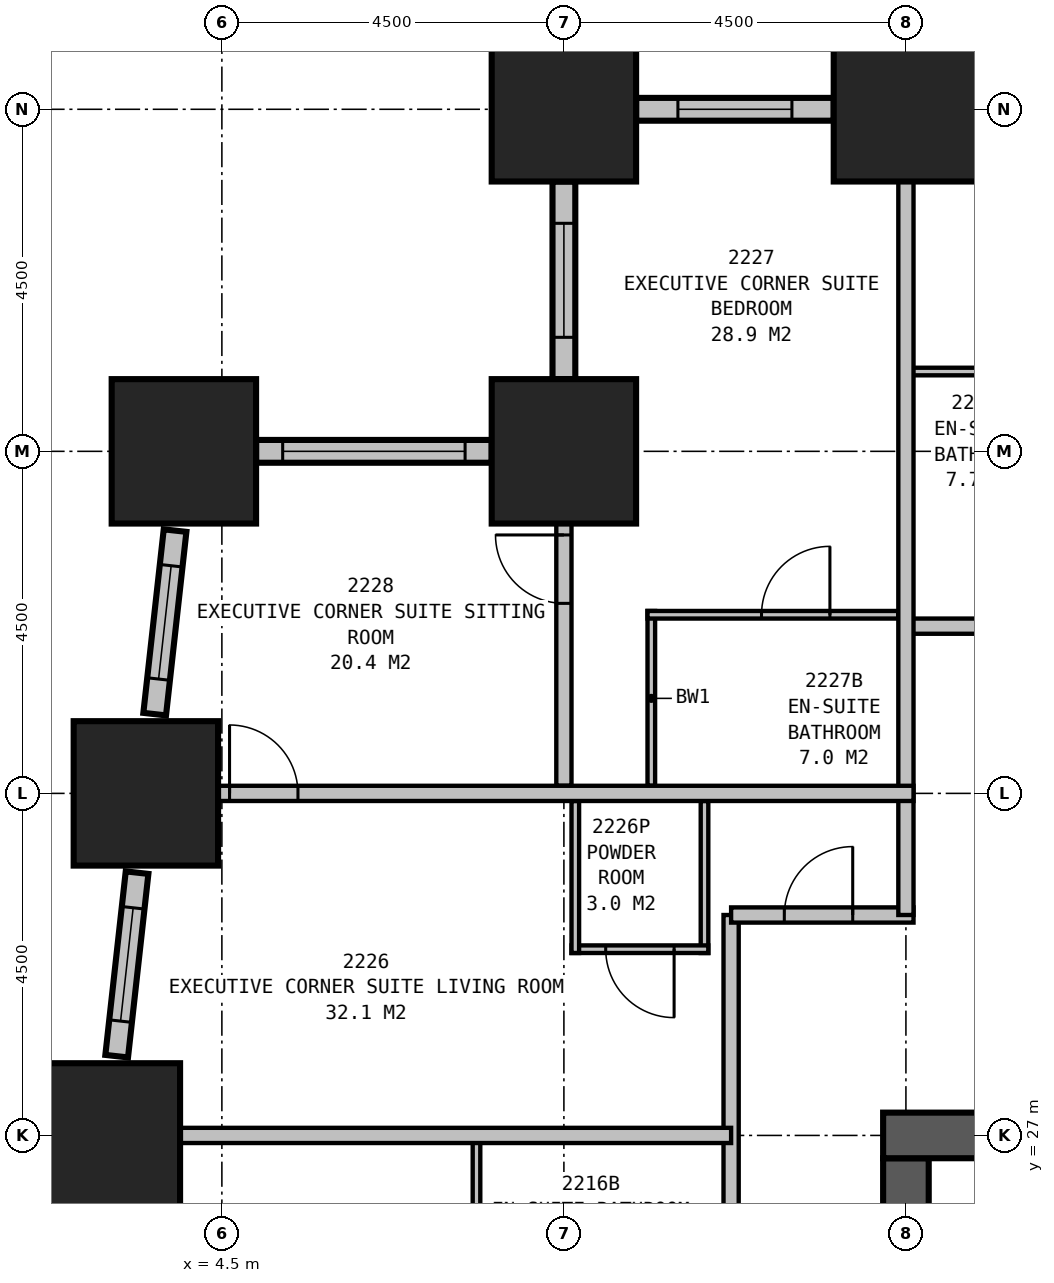
"""IFC4 building model, lengths in metres.
Left out: names, types, materials, properties, quantities, classifications, styles, units other than length and angle.
Written with IfcOpenShell. Run it as: python <this file> out.ifc"""

import sys

from ifc_helpers import new_model, si_unit, direction, frame, frame_2d, origin, origin_2d, place, context, subcontext, project, spatial, rectangle, extrude, element, fill, save


model = new_model("IFC4")
c1 = context("Model", 3, precision=1e-05, world=origin(), true_north=direction((0.0, 1.0)))
c2 = subcontext(c1, "Body", "Model", "MODEL_VIEW")
j1 = project(units=[si_unit("LENGTHUNIT", "METRE"), si_unit("PLANEANGLEUNIT", "RADIAN")], contexts=[c1])
p1 = place(None, origin())
s1 = spatial("IfcSite", under=j1, at=p1, CompositionType="ELEMENT")
p2 = place(p1, origin())
s2 = spatial("IfcBuilding", under=s1, at=p2, CompositionType="ELEMENT")
p3 = place(p2, frame((0.0, 0.0, 89.9)))
s3 = spatial("IfcBuildingStorey", under=s2, at=p3, CompositionType="ELEMENT", Elevation=89.9)
for number, where, z_axis, x_axis in (
    (1, (13.5, 40.5, 0.0), (0.0, 0.0, 1.0), (1.0, 0.0, 0.0)),
    (2, (9.0, 40.5, 0.0), (0.0, 0.0, 1.0), (1.0, 0.0, 0.0)),
    (3, (9.0, 36.0, 0.0), (0.0, 0.0, 1.0), (1.0, 0.0, 0.0)),
    (4, (4.0, 36.0, 0.0), (0.0, 0.0, 1.0), (1.0, 0.0, 0.0)),
    (5, (3.5, 31.5, 0.0), (0.0, 0.0, 1.0), (1.0, 0.0, 0.0)),
    (6, (3.0, 27.0, 0.0), (0.0, 0.0, 1.0), (1.0, 0.0, 0.0)),
):
    element("IfcColumn", number, at=place(p3, frame(where, z_axis=z_axis, x_axis=x_axis)), inside=s3, PredefinedType="COLUMN", context=c2, shape_type="SweptSolid", body=[
        extrude(rectangle(XDim=1.9, YDim=1.9, at=origin_2d()), origin(), (0.0, 0.0, 1.0), 3.5),
    ])
p4 = place(p3, frame((36.3, 27.0, 0.0), z_axis=(0.0, 0.0, 1.0), x_axis=(-1.0, 0.0, 0.0)))
e7 = element("IfcWall", 7, at=p4, inside=s3, PredefinedType="SHEAR", context=c2, shape_type="SweptSolid", body=[
    extrude(rectangle(XDim=23.1, YDim=0.6, at=frame_2d((11.55, 0.0))), origin(), (0.0, 0.0, 1.0), 3.5),
])
p5 = place(p4, frame((17.05, 0.0, 0.0)))
e8 = element("IfcOpeningElement", 8, at=p5, cuts=e7, PredefinedType="OPENING", context=c2, shape_type="SweptSolid", body=[
    extrude(rectangle(XDim=1.0, YDim=2.1, at=frame_2d((0.5, 1.05))), frame((0.0, 0.31, 0.0), z_axis=(0.0, -1.0, 0.0), x_axis=(1.0, 0.0, 0.0)), (0.0, 0.0, 1.0), 0.62),
])
p6 = place(p4, frame((12.05, 0.0, 0.0)))
e9 = element("IfcOpeningElement", 9, at=p6, cuts=e7, PredefinedType="OPENING", context=c2, shape_type="SweptSolid", body=[
    extrude(rectangle(XDim=1.0, YDim=2.1, at=frame_2d((0.5, 1.05))), frame((0.0, 0.31, 0.0), z_axis=(0.0, -1.0, 0.0), x_axis=(1.0, 0.0, 0.0)), (0.0, 0.0, 1.0), 0.62),
])
p7 = place(p4, frame((7.05, 0.0, 0.0)))
e10 = element("IfcOpeningElement", 10, at=p7, cuts=e7, PredefinedType="OPENING", context=c2, shape_type="SweptSolid", body=[
    extrude(rectangle(XDim=1.0, YDim=2.1, at=frame_2d((0.5, 1.05))), frame((0.0, 0.31, 0.0), z_axis=(0.0, -1.0, 0.0), x_axis=(1.0, 0.0, 0.0)), (0.0, 0.0, 1.0), 0.62),
])
p8 = place(p3, frame((13.5, 26.7, 0.0), z_axis=(0.0, 0.0, 1.0), x_axis=(0.0, -1.0, 0.0)))
e11 = element("IfcWall", 11, at=p8, inside=s3, PredefinedType="SHEAR", context=c2, shape_type="SweptSolid", body=[
    extrude(rectangle(XDim=6.7, YDim=0.6, at=frame_2d((3.35, 0.0))), origin(), (0.0, 0.0, 1.0), 3.5),
])
p9 = place(p3, frame((12.55, 40.5, 0.0), z_axis=(0.0, 0.0, 1.0), x_axis=(-1.0, 0.0, 0.0)))
e12 = element("IfcWall", 12, at=p9, inside=s3, PredefinedType="STANDARD", context=c2, shape_type="SweptSolid", body=[
    extrude(rectangle(XDim=2.6, YDim=0.3, at=frame_2d((1.3, 0.0))), origin(), (0.0, 0.0, 1.0), 2.15),
])
p10 = place(p9, frame((0.55, 0.0, 0.5)))
e13 = element("IfcOpeningElement", 13, at=p10, cuts=e12, PredefinedType="OPENING", context=c2, shape_type="SweptSolid", body=[
    extrude(rectangle(XDim=1.5, YDim=1.5, at=frame_2d((0.75, 0.75))), frame((0.0, 0.16, 0.0), z_axis=(0.0, -1.0, 0.0), x_axis=(1.0, 0.0, 0.0)), (0.0, 0.0, 1.0), 0.32),
])
p11 = place(p3, frame((9.0, 39.55, 0.0), z_axis=(0.0, 0.0, 1.0), x_axis=(0.0, -1.0, 0.0)))
e14 = element("IfcWall", 14, at=p11, inside=s3, PredefinedType="STANDARD", context=c2, shape_type="SweptSolid", body=[
    extrude(rectangle(XDim=2.6, YDim=0.3, at=frame_2d((1.3, 0.0))), origin(), (0.0, 0.0, 1.0), 2.15),
])
p12 = place(p11, frame((0.55, 0.0, 0.5)))
e15 = element("IfcOpeningElement", 15, at=p12, cuts=e14, PredefinedType="OPENING", context=c2, shape_type="SweptSolid", body=[
    extrude(rectangle(XDim=1.5, YDim=1.5, at=frame_2d((0.75, 0.75))), frame((0.0, 0.16, 0.0), z_axis=(0.0, -1.0, 0.0), x_axis=(1.0, 0.0, 0.0)), (0.0, 0.0, 1.0), 0.32),
])
p13 = place(p3, frame((8.05, 36.0, 0.0), z_axis=(0.0, 0.0, 1.0), x_axis=(-1.0, 0.0, 0.0)))
e16 = element("IfcWall", 16, at=p13, inside=s3, PredefinedType="STANDARD", context=c2, shape_type="SweptSolid", body=[
    extrude(rectangle(XDim=3.1, YDim=0.3, at=frame_2d((1.55, 0.0))), origin(), (0.0, 0.0, 1.0), 2.15),
])
p14 = place(p13, frame((0.35, 0.0, 0.5)))
e17 = element("IfcOpeningElement", 17, at=p14, cuts=e16, PredefinedType="OPENING", context=c2, shape_type="SweptSolid", body=[
    extrude(rectangle(XDim=2.4, YDim=1.5, at=frame_2d((1.2, 0.75))), frame((0.0, 0.16, 0.0), z_axis=(0.0, -1.0, 0.0), x_axis=(1.0, 0.0, 0.0)), (0.0, 0.0, 1.0), 0.32),
])
p15 = place(p3, frame((3.884, 34.957, 0.0), z_axis=(0.0, 0.0, 1.0), x_axis=(-0.110343286306, -0.993893535127, 0.0)))
e18 = element("IfcWall", 18, at=p15, inside=s3, PredefinedType="STANDARD", context=c2, shape_type="SweptSolid", body=[
    extrude(rectangle(XDim=2.429, YDim=0.3, at=frame_2d((1.215, 0.0))), origin(), (0.0, 0.0, 1.0), 2.15),
])
p16 = place(p15, frame((0.465, 0.0, 0.5)))
e19 = element("IfcOpeningElement", 19, at=p16, cuts=e18, PredefinedType="OPENING", context=c2, shape_type="SweptSolid", body=[
    extrude(rectangle(XDim=1.5, YDim=1.5, at=frame_2d((0.75, 0.75))), frame((0.0, 0.16, 0.0), z_axis=(0.0, -1.0, 0.0), x_axis=(1.0, 0.0, 0.0)), (0.0, 0.0, 1.0), 0.32),
])
p17 = place(p3, frame((3.384, 30.457, 0.0), z_axis=(0.0, 0.0, 1.0), x_axis=(-0.110343286306, -0.993893535127, 0.0)))
e20 = element("IfcWall", 20, at=p17, inside=s3, PredefinedType="STANDARD", context=c2, shape_type="SweptSolid", body=[
    extrude(rectangle(XDim=2.429, YDim=0.3, at=frame_2d((1.215, 0.0))), origin(), (0.0, 0.0, 1.0), 2.15),
])
p18 = place(p17, frame((0.465, 0.0, 0.5)))
e21 = element("IfcOpeningElement", 21, at=p18, cuts=e20, PredefinedType="OPENING", context=c2, shape_type="SweptSolid", body=[
    extrude(rectangle(XDim=1.5, YDim=1.5, at=frame_2d((0.75, 0.75))), frame((0.0, 0.16, 0.0), z_axis=(0.0, -1.0, 0.0), x_axis=(1.0, 0.0, 0.0)), (0.0, 0.0, 1.0), 0.32),
])
p19 = place(p3, frame((13.5, 33.7, 0.0), z_axis=(0.0, 0.0, 1.0), x_axis=(1.0, 0.0, 0.0)))
e22 = element("IfcWall", 22, at=p19, inside=s3, PredefinedType="PARTITIONING", context=c2, shape_type="SweptSolid", body=[
    extrude(rectangle(XDim=22.5, YDim=0.2, at=frame_2d((11.25, 0.0))), origin(), (0.0, 0.0, 1.0), 3.25),
])
p20 = place(p19, frame((2.95, 0.0, 0.0)))
e23 = element("IfcOpeningElement", 23, at=p20, cuts=e22, PredefinedType="OPENING", context=c2, shape_type="SweptSolid", body=[
    extrude(rectangle(XDim=0.9, YDim=2.1, at=frame_2d((0.45, 1.05))), frame((0.0, 0.11, 0.0), z_axis=(0.0, -1.0, 0.0), x_axis=(1.0, 0.0, 0.0)), (0.0, 0.0, 1.0), 0.22),
])
p21 = place(p19, frame((7.45, 0.0, 0.0)))
e24 = element("IfcOpeningElement", 24, at=p21, cuts=e22, PredefinedType="OPENING", context=c2, shape_type="SweptSolid", body=[
    extrude(rectangle(XDim=0.9, YDim=2.1, at=frame_2d((0.45, 1.05))), frame((0.0, 0.11, 0.0), z_axis=(0.0, -1.0, 0.0), x_axis=(1.0, 0.0, 0.0)), (0.0, 0.0, 1.0), 0.22),
])
p22 = place(p19, frame((9.65, 0.0, 0.0)))
e25 = element("IfcOpeningElement", 25, at=p22, cuts=e22, PredefinedType="OPENING", context=c2, shape_type="SweptSolid", body=[
    extrude(rectangle(XDim=0.9, YDim=2.1, at=frame_2d((0.45, 1.05))), frame((0.0, 0.11, 0.0), z_axis=(0.0, -1.0, 0.0), x_axis=(1.0, 0.0, 0.0)), (0.0, 0.0, 1.0), 0.22),
])
p23 = place(p19, frame((16.45, 0.0, 0.0)))
e26 = element("IfcOpeningElement", 26, at=p23, cuts=e22, PredefinedType="OPENING", context=c2, shape_type="SweptSolid", body=[
    extrude(rectangle(XDim=0.9, YDim=2.1, at=frame_2d((0.45, 1.05))), frame((0.0, 0.11, 0.0), z_axis=(0.0, -1.0, 0.0), x_axis=(1.0, 0.0, 0.0)), (0.0, 0.0, 1.0), 0.22),
])
p24 = place(p19, frame((20.95, 0.0, 0.0)))
e27 = element("IfcOpeningElement", 27, at=p24, cuts=e22, PredefinedType="OPENING", context=c2, shape_type="SweptSolid", body=[
    extrude(rectangle(XDim=0.9, YDim=2.1, at=frame_2d((0.45, 1.05))), frame((0.0, 0.11, 0.0), z_axis=(0.0, -1.0, 0.0), x_axis=(1.0, 0.0, 0.0)), (0.0, 0.0, 1.0), 0.22),
])
p25 = place(p3, frame((11.2, 29.9, 0.0), z_axis=(0.0, 0.0, 1.0), x_axis=(1.0, 0.0, 0.0)))
e28 = element("IfcWall", 28, at=p25, inside=s3, PredefinedType="PARTITIONING", context=c2, shape_type="SweptSolid", body=[
    extrude(rectangle(XDim=2.4, YDim=0.2, at=frame_2d((1.2, 0.0))), origin(), (0.0, 0.0, 1.0), 3.25),
])
p26 = place(p25, frame((0.7, 0.0, 0.0)))
e29 = element("IfcOpeningElement", 29, at=p26, cuts=e28, PredefinedType="OPENING", context=c2, shape_type="SweptSolid", body=[
    extrude(rectangle(XDim=0.9, YDim=2.1, at=frame_2d((0.45, 1.05))), frame((0.0, 0.11, 0.0), z_axis=(0.0, -1.0, 0.0), x_axis=(1.0, 0.0, 0.0)), (0.0, 0.0, 1.0), 0.22),
])
p27 = place(p3, frame((11.2, 10.6, 0.0), z_axis=(0.0, 0.0, 1.0), x_axis=(0.0, 1.0, 0.0)))
e30 = element("IfcWall", 30, at=p27, inside=s3, PredefinedType="PARTITIONING", context=c2, shape_type="SweptSolid", body=[
    extrude(rectangle(XDim=19.3, YDim=0.2, at=frame_2d((9.65, 0.0))), origin(), (0.0, 0.0, 1.0), 3.25),
])
p28 = place(p27, frame((6.05, 0.0, 0.0)))
e31 = element("IfcOpeningElement", 31, at=p28, cuts=e30, PredefinedType="OPENING", context=c2, shape_type="SweptSolid", body=[
    extrude(rectangle(XDim=1.0, YDim=2.1, at=frame_2d((0.5, 1.05))), frame((0.0, 0.11, 0.0), z_axis=(0.0, -1.0, 0.0), x_axis=(1.0, 0.0, 0.0)), (0.0, 0.0, 1.0), 0.22),
])
p29 = place(p27, frame((10.15, 0.0, 0.0)))
e32 = element("IfcOpeningElement", 32, at=p29, cuts=e30, PredefinedType="OPENING", context=c2, shape_type="SweptSolid", body=[
    extrude(rectangle(XDim=0.9, YDim=2.1, at=frame_2d((0.45, 1.05))), frame((0.0, 0.11, 0.0), z_axis=(0.0, -1.0, 0.0), x_axis=(1.0, 0.0, 0.0)), (0.0, 0.0, 1.0), 0.22),
])
p30 = place(p3, frame((13.5, 37.05, 0.0), z_axis=(0.0, 0.0, 1.0), x_axis=(1.0, 0.0, 0.0)))
e33 = element("IfcWall", 33, at=p30, inside=s3, PredefinedType="PLUMBINGWALL", context=c2, shape_type="SweptSolid", body=[
    extrude(rectangle(XDim=2.6, YDim=0.1, at=frame_2d((1.3, 0.0))), origin(), (0.0, 0.0, 1.0), 3.25),
])
p31 = place(p3, frame((7.85, 24.0, 0.0), z_axis=(0.0, 0.0, 1.0), x_axis=(0.0, 1.0, 0.0)))
e34 = element("IfcWall", 34, at=p31, inside=s3, PredefinedType="PLUMBINGWALL", context=c2, shape_type="SweptSolid", body=[
    extrude(rectangle(XDim=3.0, YDim=0.1, at=frame_2d((1.5, 0.0))), origin(), (0.0, 0.0, 1.0), 3.25),
])
p32 = place(p3, frame((11.2, 27.0, 0.0), z_axis=(0.0, 0.0, 1.0), x_axis=(-1.0, 0.0, 0.0)))
e35 = element("IfcWall", 35, at=p32, inside=s3, PredefinedType="PARTITIONING", context=c2, shape_type="SweptSolid", body=[
    extrude(rectangle(XDim=7.977, YDim=0.2, at=frame_2d((3.988, 0.0))), origin(), (0.0, 0.0, 1.0), 1.95),
])
p33 = place(p3, frame((13.5, 29.9, 0.0), z_axis=(0.0, 0.0, 1.0), x_axis=(0.0, 1.0, 0.0)))
e36 = element("IfcWall", 36, at=p33, inside=s3, PredefinedType="PARTITIONING", context=c2, shape_type="SweptSolid", body=[
    extrude(rectangle(XDim=10.6, YDim=0.2, at=frame_2d((5.3, 0.0))), origin(), (0.0, 0.0, 1.0), 2.25),
])
p34 = place(p3, frame((13.6, 31.5, 0.0), z_axis=(0.0, 0.0, 1.0), x_axis=(-1.0, 0.0, 0.0)))
e37 = element("IfcWall", 37, at=p34, inside=s3, PredefinedType="PARTITIONING", context=c2, shape_type="SweptSolid", body=[
    extrude(rectangle(XDim=10.099, YDim=0.2, at=frame_2d((5.05, 0.0))), origin(), (0.0, 0.0, 1.0), 3.25),
])
p35 = place(p34, frame((8.999, 0.0, 0.0), z_axis=(0.0, 0.0, 1.0), x_axis=(-1.0, 0.0, 0.0)))
e38 = element("IfcOpeningElement", 38, at=p35, cuts=e37, PredefinedType="OPENING", context=c2, shape_type="SweptSolid", body=[
    extrude(rectangle(XDim=0.9, YDim=2.1, at=frame_2d((0.45, 1.05))), frame((0.0, 0.11, 0.0), z_axis=(0.0, -1.0, 0.0), x_axis=(1.0, 0.0, 0.0)), (0.0, 0.0, 1.0), 0.22),
])
p36 = place(p3, frame((9.15, 31.4, 0.0), z_axis=(0.0, 0.0, 1.0), x_axis=(0.0, -1.0, 0.0)))
e39 = element("IfcWall", 39, at=p36, inside=s3, PredefinedType="PLUMBINGWALL", context=c2, shape_type="SweptSolid", body=[
    extrude(rectangle(XDim=2.0, YDim=0.1, at=frame_2d((1.0, 0.0))), origin(), (0.0, 0.0, 1.0), 2.25),
])
p37 = place(p3, frame((10.85, 31.4, 0.0), z_axis=(0.0, 0.0, 1.0), x_axis=(0.0, -1.0, 0.0)))
e40 = element("IfcWall", 40, at=p37, inside=s3, PredefinedType="PLUMBINGWALL", context=c2, shape_type="SweptSolid", body=[
    extrude(rectangle(XDim=2.0, YDim=0.1, at=frame_2d((1.0, 0.0))), origin(), (0.0, 0.0, 1.0), 3.25),
])
p38 = place(p3, frame((10.9, 29.45, 0.0), z_axis=(0.0, 0.0, 1.0), x_axis=(-1.0, 0.0, 0.0)))
e41 = element("IfcWall", 41, at=p38, inside=s3, PredefinedType="PLUMBINGWALL", context=c2, shape_type="SweptSolid", body=[
    extrude(rectangle(XDim=1.8, YDim=0.1, at=frame_2d((0.9, 0.0))), origin(), (0.0, 0.0, 1.0), 3.25),
])
p39 = place(p38, frame((0.45, 0.0, 0.0)))
e42 = element("IfcOpeningElement", 42, at=p39, cuts=e41, PredefinedType="OPENING", context=c2, shape_type="SweptSolid", body=[
    extrude(rectangle(XDim=0.9, YDim=2.1, at=frame_2d((0.45, 1.05))), frame((0.0, 0.06, 0.0), z_axis=(0.0, -1.0, 0.0), x_axis=(1.0, 0.0, 0.0)), (0.0, 0.0, 1.0), 0.12),
])
p40 = place(p3, frame((9.0, 31.6, 0.0), z_axis=(0.0, 0.0, 1.0), x_axis=(0.0, 1.0, 0.0)))
e43 = element("IfcWall", 43, at=p40, inside=s3, PredefinedType="PARTITIONING", context=c2, shape_type="SweptSolid", body=[
    extrude(rectangle(XDim=4.4, YDim=0.2, at=frame_2d((2.2, 0.0))), origin(), (0.0, 0.0, 1.0), 2.25),
])
p41 = place(p40, frame((2.4, 0.0, 0.0)))
e44 = element("IfcOpeningElement", 44, at=p41, cuts=e43, PredefinedType="OPENING", context=c2, shape_type="SweptSolid", body=[
    extrude(rectangle(XDim=0.9, YDim=2.1, at=frame_2d((0.45, 1.05))), frame((0.0, 0.11, 0.0), z_axis=(0.0, -1.0, 0.0), x_axis=(1.0, 0.0, 0.0)), (0.0, 0.0, 1.0), 0.22),
])
p42 = place(p3, frame((10.15, 31.6, 0.0), z_axis=(0.0, 0.0, 1.0), x_axis=(0.0, 1.0, 0.0)))
e45 = element("IfcWall", 45, at=p42, inside=s3, PredefinedType="PLUMBINGWALL", context=c2, shape_type="SweptSolid", body=[
    extrude(rectangle(XDim=2.3, YDim=0.1, at=frame_2d((1.15, 0.0))), origin(), (0.0, 0.0, 1.0), 3.25),
])
p43 = place(p3, frame((13.4, 33.85, 0.0), z_axis=(0.0, 0.0, 1.0), x_axis=(-1.0, 0.0, 0.0)))
e46 = element("IfcWall", 46, at=p43, inside=s3, PredefinedType="PLUMBINGWALL", context=c2, shape_type="SweptSolid", body=[
    extrude(rectangle(XDim=3.3, YDim=0.1, at=frame_2d((1.65, 0.0))), origin(), (0.0, 0.0, 1.0), 3.25),
])
p44 = place(p43, frame((1.8, 0.0, 0.0), z_axis=(0.0, 0.0, 1.0), x_axis=(-1.0, 0.0, 0.0)))
e47 = element("IfcOpeningElement", 47, at=p44, cuts=e46, PredefinedType="OPENING", context=c2, shape_type="SweptSolid", body=[
    extrude(rectangle(XDim=0.9, YDim=2.1, at=frame_2d((0.45, 1.05))), frame((0.0, 0.06, 0.0), z_axis=(0.0, -1.0, 0.0), x_axis=(1.0, 0.0, 0.0)), (0.0, 0.0, 1.0), 0.12),
])
p45 = place(p10, origin())
e48 = element("IfcWindow", 48, at=p45, inside=s3, PartitioningType="SINGLE_PANEL", PredefinedType="WINDOW", context=c2, shape_type="SweptSolid", body=[
    extrude(rectangle(XDim=1.5, YDim=1.5, at=frame_2d((0.75, 0.75))), frame((0.0, 0.03, 0.0), z_axis=(0.0, -1.0, 0.0), x_axis=(1.0, 0.0, 0.0)), (0.0, 0.0, 1.0), 0.06),
])
fill(e13, e48)
p46 = place(p12, origin())
e49 = element("IfcWindow", 49, at=p46, inside=s3, PartitioningType="SINGLE_PANEL", PredefinedType="WINDOW", context=c2, shape_type="SweptSolid", body=[
    extrude(rectangle(XDim=1.5, YDim=1.5, at=frame_2d((0.75, 0.75))), frame((0.0, 0.03, 0.0), z_axis=(0.0, -1.0, 0.0), x_axis=(1.0, 0.0, 0.0)), (0.0, 0.0, 1.0), 0.06),
])
fill(e15, e49)
p47 = place(p14, origin())
e50 = element("IfcWindow", 50, at=p47, inside=s3, PartitioningType="SINGLE_PANEL", PredefinedType="WINDOW", context=c2, shape_type="SweptSolid", body=[
    extrude(rectangle(XDim=2.4, YDim=1.5, at=frame_2d((1.2, 0.75))), frame((0.0, 0.03, 0.0), z_axis=(0.0, -1.0, 0.0), x_axis=(1.0, 0.0, 0.0)), (0.0, 0.0, 1.0), 0.06),
])
fill(e17, e50)
p48 = place(p16, origin())
e51 = element("IfcWindow", 51, at=p48, inside=s3, PartitioningType="SINGLE_PANEL", PredefinedType="WINDOW", context=c2, shape_type="SweptSolid", body=[
    extrude(rectangle(XDim=1.5, YDim=1.5, at=frame_2d((0.75, 0.75))), frame((0.0, 0.03, 0.0), z_axis=(0.0, -1.0, 0.0), x_axis=(1.0, 0.0, 0.0)), (0.0, 0.0, 1.0), 0.06),
])
fill(e19, e51)
p49 = place(p18, origin())
e52 = element("IfcWindow", 52, at=p49, inside=s3, PartitioningType="SINGLE_PANEL", PredefinedType="WINDOW", context=c2, shape_type="SweptSolid", body=[
    extrude(rectangle(XDim=1.5, YDim=1.5, at=frame_2d((0.75, 0.75))), frame((0.0, 0.03, 0.0), z_axis=(0.0, -1.0, 0.0), x_axis=(1.0, 0.0, 0.0)), (0.0, 0.0, 1.0), 0.06),
])
fill(e21, e52)
p50 = place(p26, origin())
e53 = element("IfcDoor", 53, at=p50, inside=s3, OperationType="SINGLE_SWING_RIGHT", PredefinedType="DOOR", context=c2, shape_type="SweptSolid", body=[
    extrude(rectangle(XDim=0.9, YDim=2.1, at=frame_2d((0.45, 1.05))), frame((0.0, 0.025, 0.0), z_axis=(0.0, -1.0, 0.0), x_axis=(1.0, 0.0, 0.0)), (0.0, 0.0, 1.0), 0.05),
])
fill(e29, e53)
p51 = place(p35, origin())
e54 = element("IfcDoor", 54, at=p51, inside=s3, OperationType="SINGLE_SWING_LEFT", PredefinedType="DOOR", context=c2, shape_type="SweptSolid", body=[
    extrude(rectangle(XDim=0.9, YDim=2.1, at=frame_2d((0.45, 1.05))), frame((0.0, 0.025, 0.0), z_axis=(0.0, -1.0, 0.0), x_axis=(1.0, 0.0, 0.0)), (0.0, 0.0, 1.0), 0.05),
])
fill(e38, e54)
p52 = place(p39, origin())
e55 = element("IfcDoor", 55, at=p52, inside=s3, OperationType="SINGLE_SWING_LEFT", PredefinedType="DOOR", context=c2, shape_type="SweptSolid", body=[
    extrude(rectangle(XDim=0.9, YDim=2.1, at=frame_2d((0.45, 1.05))), frame((0.0, 0.025, 0.0), z_axis=(0.0, -1.0, 0.0), x_axis=(1.0, 0.0, 0.0)), (0.0, 0.0, 1.0), 0.05),
])
fill(e42, e55)
p53 = place(p41, origin())
e56 = element("IfcDoor", 56, at=p53, inside=s3, OperationType="SINGLE_SWING_RIGHT", PredefinedType="DOOR", context=c2, shape_type="SweptSolid", body=[
    extrude(rectangle(XDim=0.9, YDim=2.1, at=frame_2d((0.45, 1.05))), frame((0.0, 0.025, 0.0), z_axis=(0.0, -1.0, 0.0), x_axis=(1.0, 0.0, 0.0)), (0.0, 0.0, 1.0), 0.05),
])
fill(e44, e56)
p54 = place(p44, origin())
e57 = element("IfcDoor", 57, at=p54, inside=s3, OperationType="SINGLE_SWING_RIGHT", PredefinedType="DOOR", context=c2, shape_type="SweptSolid", body=[
    extrude(rectangle(XDim=0.9, YDim=2.1, at=frame_2d((0.45, 1.05))), frame((0.0, 0.025, 0.0), z_axis=(0.0, -1.0, 0.0), x_axis=(1.0, 0.0, 0.0)), (0.0, 0.0, 1.0), 0.05),
])
fill(e47, e57)
save(model, sys.argv[1])
